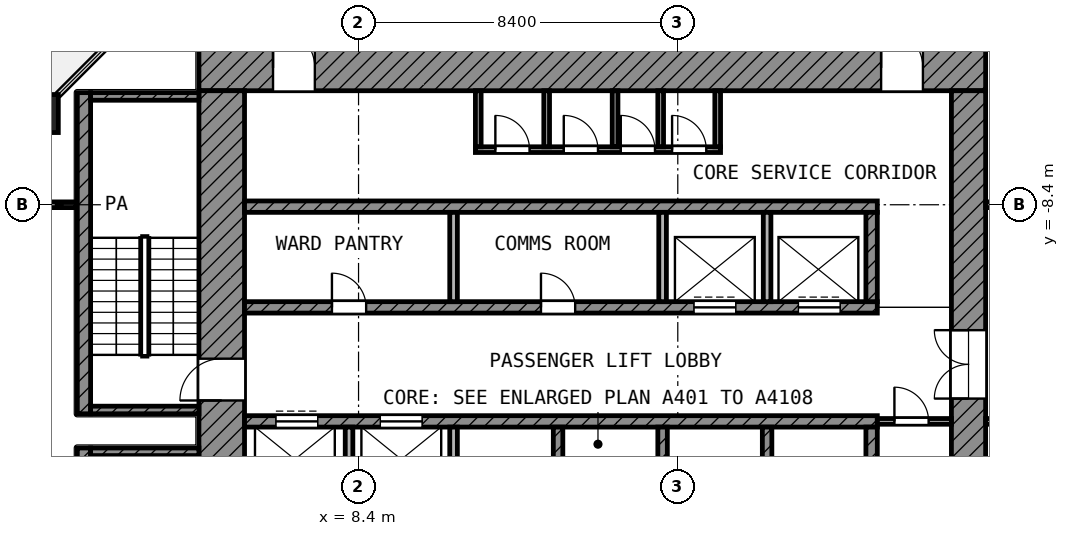
"""IFC4 building model, lengths in metres.
Left out: names, types, materials, properties, quantities, classifications, styles, units other than length and angle.
Written with IfcOpenShell. Run it as: python <this file> out.ifc"""

import sys

from ifc_helpers import new_model, si_unit, direction, frame, frame_2d, origin, origin_2d, place, context, subcontext, project, spatial, rectangle, extrude, element, fill, save


model = new_model("IFC4")
c1 = context("Model", 3, precision=1e-05, world=origin(), true_north=direction((0.0, 1.0)))
c2 = subcontext(c1, "Body", "Model", "MODEL_VIEW")
j1 = project(units=[si_unit("LENGTHUNIT", "METRE"), si_unit("PLANEANGLEUNIT", "RADIAN")], contexts=[c1])
p1 = place(None, origin())
s1 = spatial("IfcSite", under=j1, at=p1, CompositionType="ELEMENT")
p2 = place(p1, origin())
s2 = spatial("IfcBuilding", under=s1, at=p2, CompositionType="ELEMENT")
p3 = place(p2, frame((0.0, 0.0, 200.4)))
s3 = spatial("IfcBuildingStorey", under=s2, at=p3, CompositionType="ELEMENT", Elevation=200.4)
p4 = place(p3, frame((0.0, -6.0, 0.0), z_axis=(0.0, 0.0, 1.0), x_axis=(1.0, 0.0, 0.0)))
e1 = element("IfcColumn", 1, at=p4, inside=s3, PredefinedType="COLUMN", context=c2, shape_type="SweptSolid", body=[
    extrude(rectangle(XDim=1.0, YDim=1.0, at=origin_2d()), origin(), (0.0, 0.0, 1.0), 4.2),
])
p5 = place(p3, frame((4.2, -4.8, 0.0), z_axis=(0.0, 0.0, 1.0), x_axis=(1.0, 0.0, 0.0)))
e2 = element("IfcWall", 2, at=p5, inside=s3, PredefinedType="SHEAR", context=c2, shape_type="SweptSolid", body=[
    extrude(rectangle(XDim=20.7, YDim=1.2, at=frame_2d((10.35, 0.0))), origin(), (0.0, 0.0, 1.0), 3.6),
])
p6 = place(p5, frame((1.95, 0.0, 0.0)))
e3 = element("IfcOpeningElement", 3, at=p6, cuts=e2, PredefinedType="OPENING", context=c2, shape_type="SweptSolid", body=[
    extrude(rectangle(XDim=1.1, YDim=2.1, at=frame_2d((0.55, 1.05))), frame((0.0, 0.61, 0.0), z_axis=(0.0, -1.0, 0.0), x_axis=(1.0, 0.0, 0.0)), (0.0, 0.0, 1.0), 1.22),
])
p7 = place(p5, frame((17.95, 0.0, 0.0)))
e4 = element("IfcOpeningElement", 4, at=p7, cuts=e2, PredefinedType="OPENING", context=c2, shape_type="SweptSolid", body=[
    extrude(rectangle(XDim=1.1, YDim=2.1, at=frame_2d((0.55, 1.05))), frame((0.0, 0.61, 0.0), z_axis=(0.0, -1.0, 0.0), x_axis=(1.0, 0.0, 0.0)), (0.0, 0.0, 1.0), 1.22),
])
p8 = place(p3, frame((4.8, -24.9, 0.0), z_axis=(0.0, 0.0, 1.0), x_axis=(0.0, 1.0, 0.0)))
e5 = element("IfcWall", 5, at=p8, inside=s3, PredefinedType="SHEAR", context=c2, shape_type="SweptSolid", body=[
    extrude(rectangle(XDim=19.5, YDim=1.2, at=frame_2d((9.75, 0.0))), origin(), (0.0, 0.0, 1.0), 3.6),
])
p9 = place(p8, frame((11.35, 0.0, 0.0)))
e6 = element("IfcOpeningElement", 6, at=p9, cuts=e5, PredefinedType="OPENING", context=c2, shape_type="SweptSolid", body=[
    extrude(rectangle(XDim=1.1, YDim=2.1, at=frame_2d((0.55, 1.05))), frame((0.0, 0.61, 0.0), z_axis=(0.0, -1.0, 0.0), x_axis=(1.0, 0.0, 0.0)), (0.0, 0.0, 1.0), 1.22),
])
p10 = place(p8, frame((2.05, 0.0, 0.0)))
e7 = element("IfcOpeningElement", 7, at=p10, cuts=e5, PredefinedType="OPENING", context=c2, shape_type="SweptSolid", body=[
    extrude(rectangle(XDim=1.1, YDim=2.1, at=frame_2d((0.55, 1.05))), frame((0.0, 0.61, 0.0), z_axis=(0.0, -1.0, 0.0), x_axis=(1.0, 0.0, 0.0)), (0.0, 0.0, 1.0), 1.22),
])
p11 = place(p3, frame((24.45, -24.0, 0.0), z_axis=(0.0, 0.0, 1.0), x_axis=(0.0, 1.0, 0.0)))
e8 = element("IfcWall", 8, at=p11, inside=s3, PredefinedType="SHEAR", context=c2, shape_type="SweptSolid", body=[
    extrude(rectangle(XDim=18.6, YDim=0.9, at=frame_2d((9.3, 0.0))), origin(), (0.0, 0.0, 1.0), 3.6),
])
p12 = place(p11, frame((10.5, 0.0, 0.0)))
e9 = element("IfcOpeningElement", 9, at=p12, cuts=e8, PredefinedType="OPENING", context=c2, shape_type="SweptSolid", body=[
    extrude(rectangle(XDim=1.8, YDim=2.1, at=frame_2d((0.9, 1.05))), frame((0.0, 0.46, 0.0), z_axis=(0.0, -1.0, 0.0), x_axis=(1.0, 0.0, 0.0)), (0.0, 0.0, 1.0), 0.92),
])
p13 = place(p3, frame((5.4, -8.45, 0.0), z_axis=(0.0, 0.0, 1.0), x_axis=(1.0, 0.0, 0.0)))
e10 = element("IfcWall", 10, at=p13, inside=s3, PredefinedType="SHEAR", context=c2, shape_type="SweptSolid", body=[
    extrude(rectangle(XDim=16.65, YDim=0.3, at=frame_2d((8.325, 0.0))), origin(), (0.0, 0.0, 1.0), 3.6),
])
p14 = place(p3, frame((5.4, -11.1, 0.0), z_axis=(0.0, 0.0, 1.0), x_axis=(1.0, 0.0, 0.0)))
e11 = element("IfcWall", 11, at=p14, inside=s3, PredefinedType="SHEAR", context=c2, shape_type="SweptSolid", body=[
    extrude(rectangle(XDim=16.65, YDim=0.3, at=frame_2d((8.325, 0.0))), origin(), (0.0, 0.0, 1.0), 3.6),
])
p15 = place(p14, frame((11.825, 0.0, 0.0)))
e12 = element("IfcOpeningElement", 12, at=p15, cuts=e11, PredefinedType="OPENING", context=c2, shape_type="SweptSolid", body=[
    extrude(rectangle(XDim=1.1, YDim=2.1, at=frame_2d((0.55, 1.05))), frame((0.0, 0.16, 0.0), z_axis=(0.0, -1.0, 0.0), x_axis=(1.0, 0.0, 0.0)), (0.0, 0.0, 1.0), 0.32),
])
p16 = place(p14, frame((14.575, 0.0, 0.0)))
e13 = element("IfcOpeningElement", 13, at=p16, cuts=e11, PredefinedType="OPENING", context=c2, shape_type="SweptSolid", body=[
    extrude(rectangle(XDim=1.1, YDim=2.1, at=frame_2d((0.55, 1.05))), frame((0.0, 0.16, 0.0), z_axis=(0.0, -1.0, 0.0), x_axis=(1.0, 0.0, 0.0)), (0.0, 0.0, 1.0), 0.32),
])
p17 = place(p14, frame((2.3, 0.0, 0.0)))
e14 = element("IfcOpeningElement", 14, at=p17, cuts=e11, PredefinedType="OPENING", context=c2, shape_type="SweptSolid", body=[
    extrude(rectangle(XDim=0.9, YDim=2.1, at=frame_2d((0.45, 1.05))), frame((0.0, 0.16, 0.0), z_axis=(0.0, -1.0, 0.0), x_axis=(1.0, 0.0, 0.0)), (0.0, 0.0, 1.0), 0.32),
])
p18 = place(p14, frame((7.8, 0.0, 0.0)))
e15 = element("IfcOpeningElement", 15, at=p18, cuts=e11, PredefinedType="OPENING", context=c2, shape_type="SweptSolid", body=[
    extrude(rectangle(XDim=0.9, YDim=2.1, at=frame_2d((0.45, 1.05))), frame((0.0, 0.16, 0.0), z_axis=(0.0, -1.0, 0.0), x_axis=(1.0, 0.0, 0.0)), (0.0, 0.0, 1.0), 0.32),
])
p19 = place(p3, frame((5.4, -14.1, 0.0), z_axis=(0.0, 0.0, 1.0), x_axis=(1.0, 0.0, 0.0)))
e16 = element("IfcWall", 16, at=p19, inside=s3, PredefinedType="SHEAR", context=c2, shape_type="SweptSolid", body=[
    extrude(rectangle(XDim=16.65, YDim=0.3, at=frame_2d((8.325, 0.0))), origin(), (0.0, 0.0, 1.0), 3.6),
])
p20 = place(p19, frame((0.825, 0.0, 0.0)))
e17 = element("IfcOpeningElement", 17, at=p20, cuts=e16, PredefinedType="OPENING", context=c2, shape_type="SweptSolid", body=[
    extrude(rectangle(XDim=1.1, YDim=2.1, at=frame_2d((0.55, 1.05))), frame((0.0, 0.16, 0.0), z_axis=(0.0, -1.0, 0.0), x_axis=(1.0, 0.0, 0.0)), (0.0, 0.0, 1.0), 0.32),
])
p21 = place(p19, frame((3.575, 0.0, 0.0)))
e18 = element("IfcOpeningElement", 18, at=p21, cuts=e16, PredefinedType="OPENING", context=c2, shape_type="SweptSolid", body=[
    extrude(rectangle(XDim=1.1, YDim=2.1, at=frame_2d((0.55, 1.05))), frame((0.0, 0.16, 0.0), z_axis=(0.0, -1.0, 0.0), x_axis=(1.0, 0.0, 0.0)), (0.0, 0.0, 1.0), 0.32),
])
p22 = place(p3, frame((21.9, -10.95, 0.0), z_axis=(0.0, 0.0, 1.0), x_axis=(0.0, 1.0, 0.0)))
e19 = element("IfcWall", 19, at=p22, inside=s3, PredefinedType="SHEAR", context=c2, shape_type="SweptSolid", body=[
    extrude(rectangle(XDim=2.35, YDim=0.3, at=frame_2d((1.175, 0.0))), origin(), (0.0, 0.0, 1.0), 3.6),
])
p23 = place(p3, frame((21.9, -16.6, 0.0), z_axis=(0.0, 0.0, 1.0), x_axis=(0.0, 1.0, 0.0)))
e20 = element("IfcWall", 20, at=p23, inside=s3, PredefinedType="SHEAR", context=c2, shape_type="SweptSolid", body=[
    extrude(rectangle(XDim=2.35, YDim=0.3, at=frame_2d((1.175, 0.0))), origin(), (0.0, 0.0, 1.0), 3.6),
])
for number, where, z_axis, x_axis in (
    (21, (10.9, -10.95, 0.0), (0.0, 0.0, 1.0), (0.0, 1.0, 0.0)),
    (22, (16.4, -10.95, 0.0), (0.0, 0.0, 1.0), (0.0, 1.0, 0.0)),
    (23, (19.15, -10.95, 0.0), (0.0, 0.0, 1.0), (0.0, 1.0, 0.0)),
):
    element("IfcWall", number, at=place(p3, frame(where, z_axis=z_axis, x_axis=x_axis)), inside=s3, PredefinedType="PARTITIONING", context=c2, shape_type="SweptSolid", body=[
        extrude(rectangle(XDim=2.35, YDim=0.2, at=frame_2d((1.175, 0.0))), origin(), (0.0, 0.0, 1.0), 3.6),
    ])
for number, where, z_axis, x_axis in (
    (24, (8.15, -16.6, 0.0), (0.0, 0.0, 1.0), (0.0, 1.0, 0.0)),
    (25, (10.9, -16.6, 0.0), (0.0, 0.0, 1.0), (0.0, 1.0, 0.0)),
):
    element("IfcWall", number, at=place(p3, frame(where, z_axis=z_axis, x_axis=x_axis)), inside=s3, PredefinedType="PARTITIONING", context=c2, shape_type="SweptSolid", body=[
        extrude(rectangle(XDim=2.35, YDim=0.2, at=frame_2d((1.175, 0.0))), origin(), (0.0, 0.0, 1.0), 3.6),
    ])
for number, where, z_axis, x_axis in (
    (26, (13.65, -16.6, 0.0), (0.0, 0.0, 1.0), (0.0, 1.0, 0.0)),
    (27, (16.4, -16.6, 0.0), (0.0, 0.0, 1.0), (0.0, 1.0, 0.0)),
    (28, (19.15, -16.6, 0.0), (0.0, 0.0, 1.0), (0.0, 1.0, 0.0)),
):
    element("IfcWall", number, at=place(p3, frame(where, z_axis=z_axis, x_axis=x_axis)), inside=s3, PredefinedType="SHEAR", context=c2, shape_type="SweptSolid", body=[
        extrude(rectangle(XDim=2.35, YDim=0.25, at=frame_2d((1.175, 0.0))), origin(), (0.0, 0.0, 1.0), 3.6),
    ])
p24 = place(p3, frame((22.05, -14.1, 0.0), z_axis=(0.0, 0.0, 1.0), x_axis=(1.0, 0.0, 0.0)))
e29 = element("IfcWall", 29, at=p24, inside=s3, PredefinedType="PARTITIONING", context=c2, shape_type="SweptSolid", body=[
    extrude(rectangle(XDim=1.95, YDim=0.15, at=frame_2d((0.975, 0.0))), origin(), (0.0, 0.0, 1.0), 3.6),
])
p25 = place(p24, frame((0.45, 0.0, 0.0)))
e30 = element("IfcOpeningElement", 30, at=p25, cuts=e29, PredefinedType="OPENING", context=c2, shape_type="SweptSolid", body=[
    extrude(rectangle(XDim=0.9, YDim=2.1, at=frame_2d((0.45, 1.05))), frame((0.0, 0.085, 0.0), z_axis=(0.0, -1.0, 0.0), x_axis=(1.0, 0.0, 0.0)), (0.0, 0.0, 1.0), 0.17),
])
p26 = place(p3, frame((11.475, -6.95, 0.0), z_axis=(0.0, 0.0, 1.0), x_axis=(1.0, 0.0, 0.0)))
e31 = element("IfcWall", 31, at=p26, inside=s3, PredefinedType="PARTITIONING", context=c2, shape_type="SweptSolid", body=[
    extrude(rectangle(XDim=6.45, YDim=0.15, at=frame_2d((3.225, 0.0))), origin(), (0.0, 0.0, 1.0), 3.6),
])
p27 = place(p26, frame((0.525, 0.0, 0.0)))
e32 = element("IfcOpeningElement", 32, at=p27, cuts=e31, PredefinedType="OPENING", context=c2, shape_type="SweptSolid", body=[
    extrude(rectangle(XDim=0.9, YDim=2.1, at=frame_2d((0.45, 1.05))), frame((0.0, 0.085, 0.0), z_axis=(0.0, -1.0, 0.0), x_axis=(1.0, 0.0, 0.0)), (0.0, 0.0, 1.0), 0.17),
])
p28 = place(p26, frame((2.325, 0.0, 0.0)))
e33 = element("IfcOpeningElement", 33, at=p28, cuts=e31, PredefinedType="OPENING", context=c2, shape_type="SweptSolid", body=[
    extrude(rectangle(XDim=0.9, YDim=2.1, at=frame_2d((0.45, 1.05))), frame((0.0, 0.085, 0.0), z_axis=(0.0, -1.0, 0.0), x_axis=(1.0, 0.0, 0.0)), (0.0, 0.0, 1.0), 0.17),
])
p29 = place(p26, frame((3.825, 0.0, 0.0)))
e34 = element("IfcOpeningElement", 34, at=p29, cuts=e31, PredefinedType="OPENING", context=c2, shape_type="SweptSolid", body=[
    extrude(rectangle(XDim=0.9, YDim=2.1, at=frame_2d((0.45, 1.05))), frame((0.0, 0.085, 0.0), z_axis=(0.0, -1.0, 0.0), x_axis=(1.0, 0.0, 0.0)), (0.0, 0.0, 1.0), 0.17),
])
p30 = place(p26, frame((5.175, 0.0, 0.0)))
e35 = element("IfcOpeningElement", 35, at=p30, cuts=e31, PredefinedType="OPENING", context=c2, shape_type="SweptSolid", body=[
    extrude(rectangle(XDim=0.9, YDim=2.1, at=frame_2d((0.45, 1.05))), frame((0.0, 0.085, 0.0), z_axis=(0.0, -1.0, 0.0), x_axis=(1.0, 0.0, 0.0)), (0.0, 0.0, 1.0), 0.17),
])
for number, where, z_axis, x_axis in (
    (36, (11.55, -6.875, 0.0), (0.0, 0.0, 1.0), (0.0, 1.0, 0.0)),
    (37, (13.35, -6.875, 0.0), (0.0, 0.0, 1.0), (0.0, 1.0, 0.0)),
    (38, (15.15, -6.875, 0.0), (0.0, 0.0, 1.0), (0.0, 1.0, 0.0)),
    (39, (16.35, -6.875, 0.0), (0.0, 0.0, 1.0), (0.0, 1.0, 0.0)),
    (40, (17.85, -6.875, 0.0), (0.0, 0.0, 1.0), (0.0, 1.0, 0.0)),
):
    element("IfcWall", number, at=place(p3, frame(where, z_axis=z_axis, x_axis=x_axis)), inside=s3, PredefinedType="PARTITIONING", context=c2, shape_type="SweptSolid", body=[
        extrude(rectangle(XDim=1.475, YDim=0.15, at=frame_2d((0.738, 0.0))), origin(), (0.0, 0.0, 1.0), 3.6),
    ])
p31 = place(p3, frame((1.175, -13.9, 0.0), z_axis=(0.0, 0.0, 1.0), x_axis=(0.0, 1.0, 0.0)))
e41 = element("IfcWall", 41, at=p31, inside=s3, PredefinedType="SHEAR", context=c2, shape_type="SweptSolid", body=[
    extrude(rectangle(XDim=8.45, YDim=0.35, at=frame_2d((4.225, 0.0))), origin(), (0.0, 0.0, 1.0), 3.6),
])
for number, where, z_axis, x_axis in (
    (42, (1.35, -5.55, 0.0), (0.0, 0.0, 1.0), (1.0, 0.0, 0.0)),
    (43, (1.35, -13.8, 0.0), (0.0, 0.0, 1.0), (1.0, 0.0, 0.0)),
):
    element("IfcWall", number, at=place(p3, frame(where, z_axis=z_axis, x_axis=x_axis)), inside=s3, PredefinedType="SHEAR", context=c2, shape_type="SweptSolid", body=[
        extrude(rectangle(XDim=2.85, YDim=0.2, at=frame_2d((1.425, 0.0))), origin(), (0.0, 0.0, 1.0), 3.6),
    ])
p32 = place(p3, frame((1.175, -23.25, 0.0), z_axis=(0.0, 0.0, 1.0), x_axis=(0.0, 1.0, 0.0)))
e44 = element("IfcWall", 44, at=p32, inside=s3, PredefinedType="SHEAR", context=c2, shape_type="SweptSolid", body=[
    extrude(rectangle(XDim=8.45, YDim=0.35, at=frame_2d((4.225, 0.0))), origin(), (0.0, 0.0, 1.0), 3.6),
])
p33 = place(p3, frame((1.35, -14.9, 0.0), z_axis=(0.0, 0.0, 1.0), x_axis=(1.0, 0.0, 0.0)))
e45 = element("IfcWall", 45, at=p33, inside=s3, PredefinedType="SHEAR", context=c2, shape_type="SweptSolid", body=[
    extrude(rectangle(XDim=2.85, YDim=0.2, at=frame_2d((1.425, 0.0))), origin(), (0.0, 0.0, 1.0), 3.6),
])
p34 = place(p3, frame((24.9, -14.1, 0.0), z_axis=(0.0, 0.0, 1.0), x_axis=(1.0, 0.0, 0.0)))
e46 = element("IfcWall", 46, at=p34, inside=s3, PredefinedType="PARTITIONING", context=c2, shape_type="SweptSolid", body=[
    extrude(rectangle(XDim=4.425, YDim=0.15, at=frame_2d((2.212, 0.0))), origin(), (0.0, 0.0, 1.0), 3.6),
])
p35 = place(p34, frame((1.65, 0.0, 0.0)))
e47 = element("IfcOpeningElement", 47, at=p35, cuts=e46, PredefinedType="OPENING", context=c2, shape_type="SweptSolid", body=[
    extrude(rectangle(XDim=1.5, YDim=2.1, at=frame_2d((0.75, 1.05))), frame((0.0, 0.085, 0.0), z_axis=(0.0, -1.0, 0.0), x_axis=(1.0, 0.0, 0.0)), (0.0, 0.0, 1.0), 0.17),
])
p36 = place(p3, frame((0.08, -8.4, 0.0), z_axis=(0.0, 0.0, 1.0), x_axis=(1.0, 0.0, 0.0)))
e48 = element("IfcWall", 48, at=p36, inside=s3, PredefinedType="PARTITIONING", context=c2, shape_type="SweptSolid", body=[
    extrude(rectangle(XDim=0.89, YDim=0.15, at=frame_2d((0.445, 0.0))), origin(), (0.0, 0.0, 1.0), 3.6),
])
p37 = place(p3, frame((24.9, -8.4, 0.0), z_axis=(0.0, 0.0, 1.0), x_axis=(1.0, 0.0, 0.0)))
e49 = element("IfcWall", 49, at=p37, inside=s3, PredefinedType="PARTITIONING", context=c2, shape_type="SweptSolid", body=[
    extrude(rectangle(XDim=15.282, YDim=0.15, at=frame_2d((7.641, 0.0))), origin(), (0.0, 0.0, 1.0), 3.6),
])
p38 = place(p37, frame((1.75, 0.0, 0.0)))
e50 = element("IfcOpeningElement", 50, at=p38, cuts=e49, PredefinedType="OPENING", context=c2, shape_type="SweptSolid", body=[
    extrude(rectangle(XDim=1.0, YDim=2.1, at=frame_2d((0.5, 1.05))), frame((0.0, 0.085, 0.0), z_axis=(0.0, -1.0, 0.0), x_axis=(1.0, 0.0, 0.0)), (0.0, 0.0, 1.0), 0.17),
])
p39 = place(p37, frame((5.85, 0.0, 0.0)))
e51 = element("IfcOpeningElement", 51, at=p39, cuts=e49, PredefinedType="OPENING", context=c2, shape_type="SweptSolid", body=[
    extrude(rectangle(XDim=1.2, YDim=2.1, at=frame_2d((0.6, 1.05))), frame((0.0, 0.085, 0.0), z_axis=(0.0, -1.0, 0.0), x_axis=(1.0, 0.0, 0.0)), (0.0, 0.0, 1.0), 0.17),
])
p40 = place(p37, frame((9.3, 0.0, 0.0)))
e52 = element("IfcOpeningElement", 52, at=p40, cuts=e49, PredefinedType="OPENING", context=c2, shape_type="SweptSolid", body=[
    extrude(rectangle(XDim=1.2, YDim=2.1, at=frame_2d((0.6, 1.05))), frame((0.0, 0.085, 0.0), z_axis=(0.0, -1.0, 0.0), x_axis=(1.0, 0.0, 0.0)), (0.0, 0.0, 1.0), 0.17),
])
p41 = place(p15, origin())
e53 = element("IfcDoor", 53, at=p41, inside=s3, OperationType="DOUBLE_DOOR_SLIDING", PredefinedType="DOOR", context=c2, shape_type="SweptSolid", body=[
    extrude(rectangle(XDim=1.1, YDim=2.1, at=frame_2d((0.55, 1.05))), frame((0.0, 0.025, 0.0), z_axis=(0.0, -1.0, 0.0), x_axis=(1.0, 0.0, 0.0)), (0.0, 0.0, 1.0), 0.05),
])
fill(e12, e53)
p42 = place(p16, origin())
e54 = element("IfcDoor", 54, at=p42, inside=s3, OperationType="DOUBLE_DOOR_SLIDING", PredefinedType="DOOR", context=c2, shape_type="SweptSolid", body=[
    extrude(rectangle(XDim=1.1, YDim=2.1, at=frame_2d((0.55, 1.05))), frame((0.0, 0.025, 0.0), z_axis=(0.0, -1.0, 0.0), x_axis=(1.0, 0.0, 0.0)), (0.0, 0.0, 1.0), 0.05),
])
fill(e13, e54)
p43 = place(p20, origin())
e55 = element("IfcDoor", 55, at=p43, inside=s3, OperationType="DOUBLE_DOOR_SLIDING", PredefinedType="DOOR", context=c2, shape_type="SweptSolid", body=[
    extrude(rectangle(XDim=1.1, YDim=2.1, at=frame_2d((0.55, 1.05))), frame((0.0, 0.025, 0.0), z_axis=(0.0, -1.0, 0.0), x_axis=(1.0, 0.0, 0.0)), (0.0, 0.0, 1.0), 0.05),
])
fill(e17, e55)
p44 = place(p21, origin())
e56 = element("IfcDoor", 56, at=p44, inside=s3, OperationType="DOUBLE_DOOR_SLIDING", PredefinedType="DOOR", context=c2, shape_type="SweptSolid", body=[
    extrude(rectangle(XDim=1.1, YDim=2.1, at=frame_2d((0.55, 1.05))), frame((0.0, 0.025, 0.0), z_axis=(0.0, -1.0, 0.0), x_axis=(1.0, 0.0, 0.0)), (0.0, 0.0, 1.0), 0.05),
])
fill(e18, e56)
p45 = place(p9, origin())
e57 = element("IfcDoor", 57, at=p45, inside=s3, OperationType="SINGLE_SWING_LEFT", PredefinedType="DOOR", context=c2, shape_type="SweptSolid", body=[
    extrude(rectangle(XDim=1.1, YDim=2.1, at=frame_2d((0.55, 1.05))), frame((0.0, 0.025, 0.0), z_axis=(0.0, -1.0, 0.0), x_axis=(1.0, 0.0, 0.0)), (0.0, 0.0, 1.0), 0.05),
])
fill(e6, e57)
p46 = place(p6, origin())
e58 = element("IfcDoor", 58, at=p46, inside=s3, OperationType="SINGLE_SWING_LEFT", PredefinedType="DOOR", context=c2, shape_type="SweptSolid", body=[
    extrude(rectangle(XDim=1.1, YDim=2.1, at=frame_2d((0.55, 1.05))), frame((0.0, 0.025, 0.0), z_axis=(0.0, -1.0, 0.0), x_axis=(1.0, 0.0, 0.0)), (0.0, 0.0, 1.0), 0.05),
])
fill(e3, e58)
p47 = place(p7, origin())
e59 = element("IfcDoor", 59, at=p47, inside=s3, OperationType="SINGLE_SWING_LEFT", PredefinedType="DOOR", context=c2, shape_type="SweptSolid", body=[
    extrude(rectangle(XDim=1.1, YDim=2.1, at=frame_2d((0.55, 1.05))), frame((0.0, 0.025, 0.0), z_axis=(0.0, -1.0, 0.0), x_axis=(1.0, 0.0, 0.0)), (0.0, 0.0, 1.0), 0.05),
])
fill(e4, e59)
p48 = place(p12, origin())
e60 = element("IfcDoor", 60, at=p48, inside=s3, OperationType="DOUBLE_DOOR_SINGLE_SWING", PredefinedType="DOOR", context=c2, shape_type="SweptSolid", body=[
    extrude(rectangle(XDim=1.8, YDim=2.1, at=frame_2d((0.9, 1.05))), frame((0.0, 0.025, 0.0), z_axis=(0.0, -1.0, 0.0), x_axis=(1.0, 0.0, 0.0)), (0.0, 0.0, 1.0), 0.05),
])
fill(e9, e60)
p49 = place(p27, origin())
e61 = element("IfcDoor", 61, at=p49, inside=s3, OperationType="SINGLE_SWING_LEFT", PredefinedType="DOOR", context=c2, shape_type="SweptSolid", body=[
    extrude(rectangle(XDim=0.9, YDim=2.1, at=frame_2d((0.45, 1.05))), frame((0.0, 0.025, 0.0), z_axis=(0.0, -1.0, 0.0), x_axis=(1.0, 0.0, 0.0)), (0.0, 0.0, 1.0), 0.05),
])
fill(e32, e61)
p50 = place(p28, origin())
e62 = element("IfcDoor", 62, at=p50, inside=s3, OperationType="SINGLE_SWING_LEFT", PredefinedType="DOOR", context=c2, shape_type="SweptSolid", body=[
    extrude(rectangle(XDim=0.9, YDim=2.1, at=frame_2d((0.45, 1.05))), frame((0.0, 0.025, 0.0), z_axis=(0.0, -1.0, 0.0), x_axis=(1.0, 0.0, 0.0)), (0.0, 0.0, 1.0), 0.05),
])
fill(e33, e62)
p51 = place(p29, origin())
e63 = element("IfcDoor", 63, at=p51, inside=s3, OperationType="SINGLE_SWING_LEFT", PredefinedType="DOOR", context=c2, shape_type="SweptSolid", body=[
    extrude(rectangle(XDim=0.9, YDim=2.1, at=frame_2d((0.45, 1.05))), frame((0.0, 0.025, 0.0), z_axis=(0.0, -1.0, 0.0), x_axis=(1.0, 0.0, 0.0)), (0.0, 0.0, 1.0), 0.05),
])
fill(e34, e63)
p52 = place(p30, origin())
e64 = element("IfcDoor", 64, at=p52, inside=s3, OperationType="SINGLE_SWING_LEFT", PredefinedType="DOOR", context=c2, shape_type="SweptSolid", body=[
    extrude(rectangle(XDim=0.9, YDim=2.1, at=frame_2d((0.45, 1.05))), frame((0.0, 0.025, 0.0), z_axis=(0.0, -1.0, 0.0), x_axis=(1.0, 0.0, 0.0)), (0.0, 0.0, 1.0), 0.05),
])
fill(e35, e64)
p53 = place(p25, origin())
e65 = element("IfcDoor", 65, at=p53, inside=s3, OperationType="SINGLE_SWING_LEFT", PredefinedType="DOOR", context=c2, shape_type="SweptSolid", body=[
    extrude(rectangle(XDim=0.9, YDim=2.1, at=frame_2d((0.45, 1.05))), frame((0.0, 0.025, 0.0), z_axis=(0.0, -1.0, 0.0), x_axis=(1.0, 0.0, 0.0)), (0.0, 0.0, 1.0), 0.05),
])
fill(e30, e65)
p54 = place(p17, origin())
e66 = element("IfcDoor", 66, at=p54, inside=s3, OperationType="SINGLE_SWING_LEFT", PredefinedType="DOOR", context=c2, shape_type="SweptSolid", body=[
    extrude(rectangle(XDim=0.9, YDim=2.1, at=frame_2d((0.45, 1.05))), frame((0.0, 0.025, 0.0), z_axis=(0.0, -1.0, 0.0), x_axis=(1.0, 0.0, 0.0)), (0.0, 0.0, 1.0), 0.05),
])
fill(e14, e66)
p55 = place(p18, origin())
e67 = element("IfcDoor", 67, at=p55, inside=s3, OperationType="SINGLE_SWING_LEFT", PredefinedType="DOOR", context=c2, shape_type="SweptSolid", body=[
    extrude(rectangle(XDim=0.9, YDim=2.1, at=frame_2d((0.45, 1.05))), frame((0.0, 0.025, 0.0), z_axis=(0.0, -1.0, 0.0), x_axis=(1.0, 0.0, 0.0)), (0.0, 0.0, 1.0), 0.05),
])
fill(e15, e67)
save(model, sys.argv[1])
